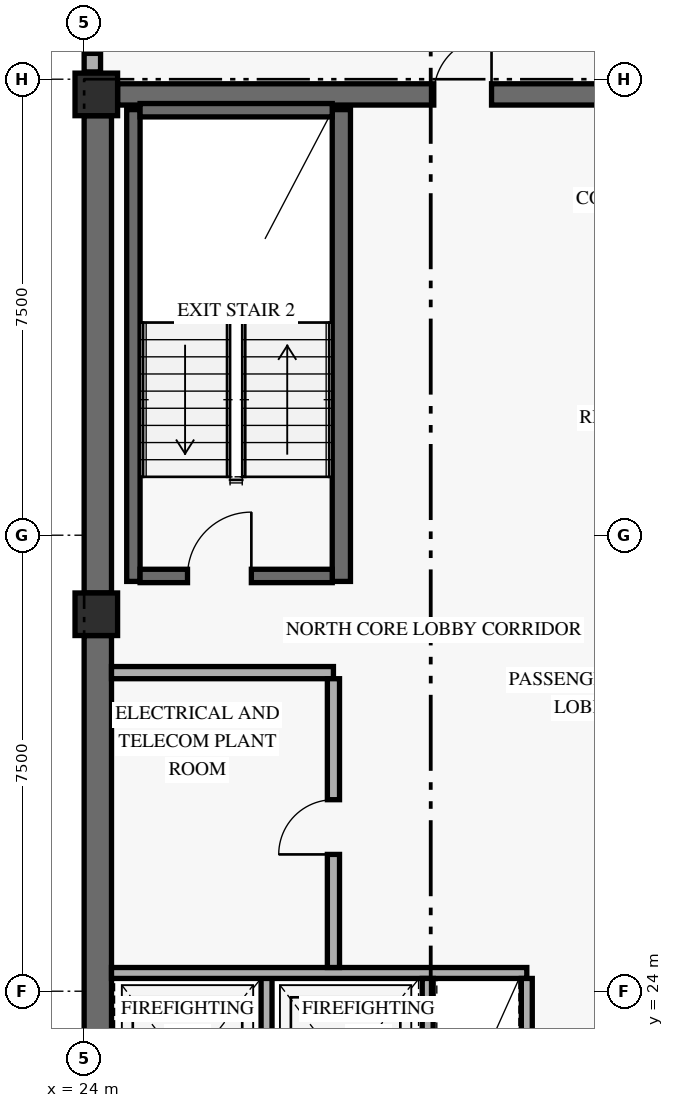
"""IFC4 building model, lengths in metres.
Left out: names, types, materials, properties, quantities, classifications, styles, units other than length and angle.
Written with IfcOpenShell. Run it as: python <this file> out.ifc"""

import sys

from ifc_helpers import new_model, si_unit, direction, frame, frame_2d, origin, origin_2d, place, context, subcontext, project, spatial, rectangle, extrude, element, fill, save


model = new_model("IFC4")
c1 = context("Model", 3, precision=1e-05, world=origin(), true_north=direction((0.0, 1.0)))
c2 = subcontext(c1, "Body", "Model", "MODEL_VIEW")
j1 = project(units=[si_unit("LENGTHUNIT", "METRE"), si_unit("PLANEANGLEUNIT", "RADIAN")], contexts=[c1])
p1 = place(None, origin())
s1 = spatial("IfcSite", under=j1, at=p1, CompositionType="ELEMENT")
p2 = place(p1, origin())
s2 = spatial("IfcBuilding", under=s1, at=p2, CompositionType="ELEMENT")
p3 = place(p2, frame((0.0, 0.0, 271.2)))
s3 = spatial("IfcBuildingStorey", under=s2, at=p3, CompositionType="ELEMENT", Elevation=271.2)
p4 = place(p3, frame((24.225, 17.9, 0.0), z_axis=(0.0, 0.0, 1.0), x_axis=(0.0, 1.0, 0.0)))
e1 = element("IfcWall", 1, at=p4, inside=s3, PredefinedType="SHEAR", context=c2, shape_type="SweptSolid", body=[
    extrude(rectangle(XDim=11.95, YDim=0.45, at=frame_2d((5.975, 0.0))), origin(), (0.0, 0.0, 1.0), 2.821),
])
p5 = place(p3, frame((24.225, 30.55, 0.0), z_axis=(0.0, 0.0, 1.0), x_axis=(0.0, 1.0, 0.0)))
e2 = element("IfcWall", 2, at=p5, inside=s3, PredefinedType="SHEAR", context=c2, shape_type="SweptSolid", body=[
    extrude(rectangle(XDim=7.85, YDim=0.45, at=frame_2d((3.925, 0.0))), origin(), (0.0, 0.0, 1.0), 2.821),
])
p6 = place(p3, frame((24.55, 38.75, 0.0), z_axis=(0.0, 0.0, 1.0), x_axis=(1.0, 0.0, 0.0)))
e3 = element("IfcWall", 3, at=p6, inside=s3, PredefinedType="SHEAR", context=c2, shape_type="SweptSolid", body=[
    extrude(rectangle(XDim=10.3, YDim=0.35, at=frame_2d((5.15, 0.0))), origin(), (0.0, 0.0, 1.0), 3.36),
])
p7 = place(p6, frame((5.2, 0.0, 0.0)))
e4 = element("IfcOpeningElement", 4, at=p7, cuts=e3, PredefinedType="OPENING", context=c2, shape_type="SweptSolid", body=[
    extrude(rectangle(XDim=0.95, YDim=2.15, at=frame_2d((0.475, 1.075))), frame((0.0, 0.185, 0.0), z_axis=(0.0, -1.0, 0.0), x_axis=(1.0, 0.0, 0.0)), (0.0, 0.0, 1.0), 0.37),
])
p8 = place(p3, frame((24.81, 30.74, 0.0), z_axis=(0.0, 0.0, 1.0), x_axis=(0.0, 1.0, 0.0)))
e5 = element("IfcWall", 5, at=p8, inside=s3, PredefinedType="SHEAR", context=c2, shape_type="SweptSolid", body=[
    extrude(rectangle(XDim=7.76, YDim=0.22, at=frame_2d((3.88, 0.0))), origin(), (0.0, 0.0, 1.0), 3.36),
])
p9 = place(p3, frame((28.23, 30.74, 0.0), z_axis=(0.0, 0.0, 1.0), x_axis=(0.0, 1.0, 0.0)))
e6 = element("IfcWall", 6, at=p9, inside=s3, PredefinedType="SHEAR", context=c2, shape_type="SweptSolid", body=[
    extrude(rectangle(XDim=7.76, YDim=0.3, at=frame_2d((3.88, 0.0))), origin(), (0.0, 0.0, 1.0), 3.36),
])
p10 = place(p3, frame((24.92, 30.83, 0.0), z_axis=(0.0, 0.0, 1.0), x_axis=(1.0, 0.0, 0.0)))
e7 = element("IfcWall", 7, at=p10, inside=s3, PredefinedType="SHEAR", context=c2, shape_type="SweptSolid", body=[
    extrude(rectangle(XDim=3.16, YDim=0.22, at=frame_2d((1.58, 0.0))), origin(), (0.0, 0.0, 1.0), 3.36),
])
p11 = place(p10, frame((0.78, 0.0, 0.0)))
e8 = element("IfcOpeningElement", 8, at=p11, cuts=e7, PredefinedType="OPENING", context=c2, shape_type="SweptSolid", body=[
    extrude(rectangle(XDim=1.05, YDim=2.15, at=frame_2d((0.525, 1.075))), frame((0.0, 0.12, 0.0), z_axis=(0.0, -1.0, 0.0), x_axis=(1.0, 0.0, 0.0)), (0.0, 0.0, 1.0), 0.24),
])
p12 = place(p3, frame((24.92, 38.49, 0.0), z_axis=(0.0, 0.0, 1.0), x_axis=(1.0, 0.0, 0.0)))
e9 = element("IfcWall", 9, at=p12, inside=s3, PredefinedType="SHEAR", context=c2, shape_type="SweptSolid", body=[
    extrude(rectangle(XDim=3.16, YDim=0.22, at=frame_2d((1.58, 0.0))), origin(), (0.0, 0.0, 1.0), 3.36),
])
for number, where, z_axis, x_axis in (
    (10, (24.2, 30.2, 0.0), (0.0, 0.0, 1.0), (1.0, 0.0, 0.0)),
    (11, (24.2, 38.75, 0.0), (0.0, 0.0, 1.0), (1.0, 0.0, 0.0)),
):
    element("IfcColumn", number, at=place(p3, frame(where, z_axis=z_axis, x_axis=x_axis)), inside=s3, PredefinedType="COLUMN", context=c2, shape_type="SweptSolid", body=[
        extrude(rectangle(XDim=0.7, YDim=0.7, at=origin_2d()), origin(), (0.0, 0.0, 1.0), 3.6),
    ])
p13 = place(p3, frame((24.135, 39.12, 0.0), z_axis=(0.0, 0.0, 1.0), x_axis=(0.0, 1.0, 0.0)))
e12 = element("IfcWall", 12, at=p13, inside=s3, PredefinedType="SOLIDWALL", context=c2, shape_type="SweptSolid", body=[
    extrude(rectangle(XDim=1.56, YDim=0.27, at=frame_2d((0.78, 0.0))), origin(), (0.0, 0.0, 1.0), 2.803),
])
p14 = place(p13, frame((0.305, 0.0, 0.85)))
e13 = element("IfcOpeningElement", 13, at=p14, cuts=e12, PredefinedType="OPENING", context=c2, shape_type="SweptSolid", body=[
    extrude(rectangle(XDim=0.95, YDim=1.5, at=frame_2d((0.475, 0.75))), frame((0.0, 0.145, 0.0), z_axis=(0.0, -1.0, 0.0), x_axis=(1.0, 0.0, 0.0)), (0.0, 0.0, 1.0), 0.29),
])
p15 = place(p3, frame((27.0, 21.19, 0.0), z_axis=(0.0, 0.0, 1.0), x_axis=(0.0, 1.0, 0.0)))
e14 = element("IfcWall", 14, at=p15, inside=s3, PredefinedType="STANDARD", context=c2, shape_type="SweptSolid", body=[
    extrude(rectangle(XDim=3.11, YDim=0.18, at=frame_2d((1.555, 0.0))), origin(), (0.0, 0.0, 1.0), 3.36),
])
p16 = place(p3, frame((24.45, 24.3, 0.0), z_axis=(0.0, 0.0, 1.0), x_axis=(1.0, 0.0, 0.0)))
e15 = element("IfcWall", 15, at=p16, inside=s3, PredefinedType="STANDARD", context=c2, shape_type="SweptSolid", body=[
    extrude(rectangle(XDim=6.83, YDim=0.18, at=frame_2d((3.415, 0.0))), origin(), (0.0, 0.0, 1.0), 3.36),
])
for number, where, z_axis, x_axis in (
    (16, (29.65, 21.19, 0.0), (0.0, 0.0, 1.0), (0.0, 1.0, 0.0)),
    (17, (31.28, 21.19, 0.0), (0.0, 0.0, 1.0), (0.0, 1.0, 0.0)),
):
    element("IfcWall", number, at=place(p3, frame(where, z_axis=z_axis, x_axis=x_axis)), inside=s3, PredefinedType="STANDARD", context=c2, shape_type="SweptSolid", body=[
        extrude(rectangle(XDim=3.02, YDim=0.18, at=frame_2d((1.51, 0.0))), origin(), (0.0, 0.0, 1.0), 3.36),
    ])
p17 = place(p3, frame((24.45, 29.24, 0.0), z_axis=(0.0, 0.0, 1.0), x_axis=(1.0, 0.0, 0.0)))
e18 = element("IfcWall", 18, at=p17, inside=s3, PredefinedType="STANDARD", context=c2, shape_type="SweptSolid", body=[
    extrude(rectangle(XDim=3.65, YDim=0.2, at=frame_2d((1.825, 0.0))), origin(), (0.0, 0.0, 1.0), 3.36),
])
p18 = place(p3, frame((28.1, 24.39, 0.0), z_axis=(0.0, 0.0, 1.0), x_axis=(0.0, 1.0, 0.0)))
e19 = element("IfcWall", 19, at=p18, inside=s3, PredefinedType="STANDARD", context=c2, shape_type="SweptSolid", body=[
    extrude(rectangle(XDim=4.75, YDim=0.2, at=frame_2d((2.375, 0.0))), origin(), (0.0, 0.0, 1.0), 3.36),
])
p19 = place(p18, frame((1.86, 0.0, 0.0)))
e20 = element("IfcOpeningElement", 20, at=p19, cuts=e19, PredefinedType="OPENING", context=c2, shape_type="SweptSolid", body=[
    extrude(rectangle(XDim=0.9, YDim=2.1, at=frame_2d((0.45, 1.05))), frame((0.0, 0.11, 0.0), z_axis=(0.0, -1.0, 0.0), x_axis=(1.0, 0.0, 0.0)), (0.0, 0.0, 1.0), 0.22),
])
p20 = place(p14, origin())
e21 = element("IfcWindow", 21, at=p20, inside=s3, PartitioningType="SINGLE_PANEL", PredefinedType="WINDOW", context=c2, shape_type="SweptSolid", body=[
    extrude(rectangle(XDim=0.95, YDim=1.5, at=frame_2d((0.475, 0.75))), frame((0.0, 0.03, 0.0), z_axis=(0.0, -1.0, 0.0), x_axis=(1.0, 0.0, 0.0)), (0.0, 0.0, 1.0), 0.06),
])
fill(e13, e21)
p21 = place(p11, origin())
e22 = element("IfcDoor", 22, at=p21, inside=s3, OperationType="SINGLE_SWING_RIGHT", PredefinedType="DOOR", context=c2, shape_type="SweptSolid", body=[
    extrude(rectangle(XDim=1.05, YDim=2.15, at=frame_2d((0.525, 1.075))), frame((0.0, 0.025, 0.0), z_axis=(0.0, -1.0, 0.0), x_axis=(1.0, 0.0, 0.0)), (0.0, 0.0, 1.0), 0.05),
])
fill(e8, e22)
p22 = place(p19, origin())
e23 = element("IfcDoor", 23, at=p22, inside=s3, OperationType="SINGLE_SWING_LEFT", PredefinedType="DOOR", context=c2, shape_type="SweptSolid", body=[
    extrude(rectangle(XDim=0.9, YDim=2.1, at=frame_2d((0.45, 1.05))), frame((0.0, 0.025, 0.0), z_axis=(0.0, -1.0, 0.0), x_axis=(1.0, 0.0, 0.0)), (0.0, 0.0, 1.0), 0.05),
])
fill(e20, e23)
p23 = place(p7, origin())
e24 = element("IfcDoor", 24, at=p23, inside=s3, OperationType="SINGLE_SWING_RIGHT", PredefinedType="DOOR", context=c2, shape_type="SweptSolid", body=[
    extrude(rectangle(XDim=0.95, YDim=2.15, at=frame_2d((0.475, 1.075))), frame((0.0, 0.025, 0.0), z_axis=(0.0, -1.0, 0.0), x_axis=(1.0, 0.0, 0.0)), (0.0, 0.0, 1.0), 0.05),
])
fill(e4, e24)
save(model, sys.argv[1])
